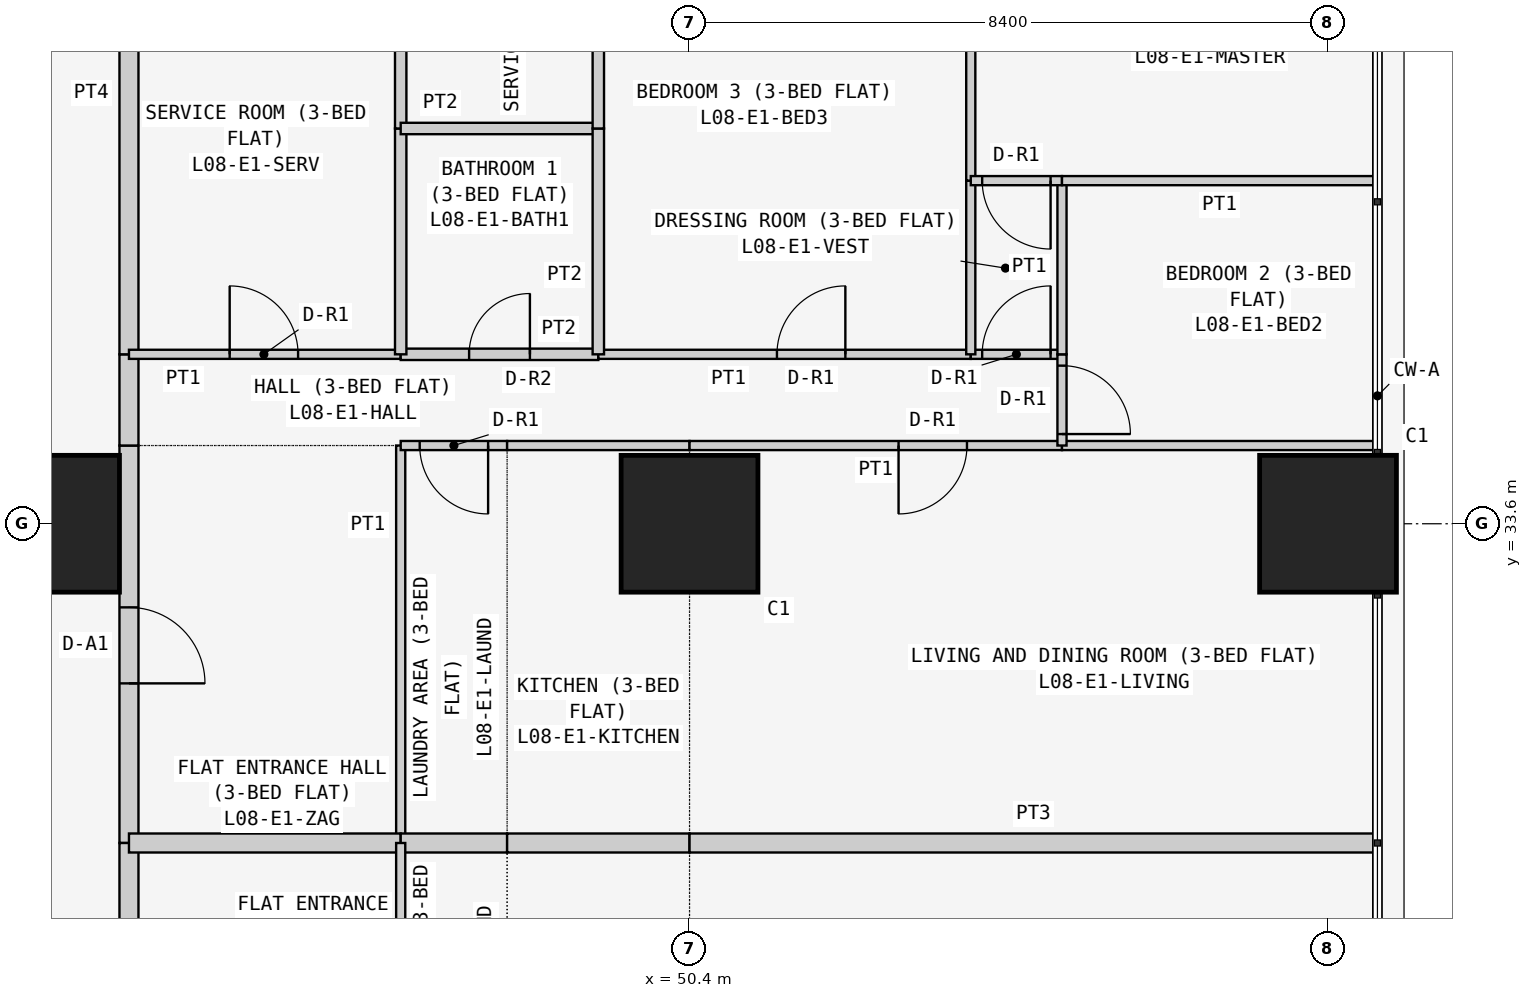
"""IFC4 building model, lengths in metres.
Left out: names, types, materials, properties, quantities, classifications, styles, units other than length and angle.
Written with IfcOpenShell. Run it as: python <this file> out.ifc"""

import sys

from ifc_helpers import new_model, si_unit, direction, frame, frame_2d, origin, origin_2d, place, context, subcontext, project, spatial, rectangle, extrude, element, fill, save


model = new_model("IFC4")
c1 = context("Model", 3, precision=1e-05, world=origin(), true_north=direction((0.0, 1.0)))
c2 = subcontext(c1, "Body", "Model", "MODEL_VIEW")
j1 = project(units=[si_unit("LENGTHUNIT", "METRE"), si_unit("PLANEANGLEUNIT", "RADIAN")], contexts=[c1])
p1 = place(None, origin())
s1 = spatial("IfcSite", under=j1, at=p1, CompositionType="ELEMENT")
p2 = place(p1, origin())
s2 = spatial("IfcBuilding", under=s1, at=p2, CompositionType="ELEMENT")
p3 = place(p2, frame((0.0, 0.0, 38.1)))
s3 = spatial("IfcBuildingStorey", under=s2, at=p3, CompositionType="ELEMENT", Elevation=38.1)
for number, where, z_axis, x_axis in (
    (1, (42.0, 33.6, 0.0), (0.0, 0.0, 1.0), (1.0, 0.0, 0.0)),
    (2, (50.4, 33.6, 0.0), (0.0, 0.0, 1.0), (1.0, 0.0, 0.0)),
    (3, (58.8, 33.6, 0.0), (0.0, 0.0, 1.0), (1.0, 0.0, 0.0)),
):
    element("IfcColumn", number, at=place(p3, frame(where, z_axis=z_axis, x_axis=x_axis)), inside=s3, PredefinedType="COLUMN", context=c2, shape_type="SweptSolid", body=[
        extrude(rectangle(XDim=1.8, YDim=1.8, at=origin_2d()), origin(), (0.0, 0.0, 1.0), 3.6),
    ])
p4 = place(p3, frame((43.025, 34.629, 0.0), z_axis=(0.0, 0.0, 1.0), x_axis=(0.0, -1.0, 0.0)))
e4 = element("IfcWall", 4, at=p4, inside=s3, PredefinedType="PARTITIONING", context=c2, shape_type="SweptSolid", body=[
    extrude(rectangle(XDim=5.229, YDim=0.25, at=frame_2d((2.615, 0.0))), origin(), (0.0, 0.0, 1.0), 3.45),
])
p5 = place(p4, frame((2.129, 0.0, 0.0)))
e5 = element("IfcOpeningElement", 5, at=p5, cuts=e4, PredefinedType="OPENING", context=c2, shape_type="SweptSolid", body=[
    extrude(rectangle(XDim=1.0, YDim=2.1, at=frame_2d((0.5, 1.05))), frame((0.0, 0.135, 0.0), z_axis=(0.0, -1.0, 0.0), x_axis=(1.0, 0.0, 0.0)), (0.0, 0.0, 1.0), 0.27),
])
p6 = place(p3, frame((43.025, 35.829, 0.0), z_axis=(0.0, 0.0, 1.0), x_axis=(0.0, -1.0, 0.0)))
e6 = element("IfcWall", 6, at=p6, inside=s3, PredefinedType="PARTITIONING", context=c2, shape_type="SweptSolid", body=[
    extrude(rectangle(XDim=1.2, YDim=0.25, at=frame_2d((0.6, 0.0))), origin(), (0.0, 0.0, 1.0), 3.45),
])
p7 = place(p3, frame((43.025, 42.7, 0.0), z_axis=(0.0, 0.0, 1.0), x_axis=(0.0, -1.0, 0.0)))
e7 = element("IfcWall", 7, at=p7, inside=s3, PredefinedType="PARTITIONING", context=c2, shape_type="SweptSolid", body=[
    extrude(rectangle(XDim=6.871, YDim=0.25, at=frame_2d((3.436, 0.0))), origin(), (0.0, 0.0, 1.0), 3.45),
])
p8 = place(p3, frame((43.025, 29.4, 0.0), z_axis=(0.0, 0.0, 1.0), x_axis=(0.0, -1.0, 0.0)))
e8 = element("IfcWall", 8, at=p8, inside=s3, PredefinedType="PARTITIONING", context=c2, shape_type="SweptSolid", body=[
    extrude(rectangle(XDim=5.229, YDim=0.25, at=frame_2d((2.615, 0.0))), origin(), (0.0, 0.0, 1.0), 3.45),
])
p9 = place(p8, frame((2.1, 0.0, 0.0)))
e9 = element("IfcOpeningElement", 9, at=p9, cuts=e8, PredefinedType="OPENING", context=c2, shape_type="SweptSolid", body=[
    extrude(rectangle(XDim=1.0, YDim=2.1, at=frame_2d((0.5, 1.05))), frame((0.0, 0.135, 0.0), z_axis=(0.0, -1.0, 0.0), x_axis=(1.0, 0.0, 0.0)), (0.0, 0.0, 1.0), 0.27),
])
p10 = place(p3, frame((46.6, 29.4, 0.0), z_axis=(0.0, 0.0, 1.0), x_axis=(0.0, 1.0, 0.0)))
e10 = element("IfcWall", 10, at=p10, inside=s3, PredefinedType="PARTITIONING", context=c2, shape_type="SweptSolid", body=[
    extrude(rectangle(XDim=5.229, YDim=0.12, at=frame_2d((2.615, 0.0))), origin(), (0.0, 0.0, 1.0), 3.45),
])
p11 = place(p3, frame((43.025, 29.4, 0.0), z_axis=(0.0, 0.0, 1.0), x_axis=(1.0, 0.0, 0.0)))
e11 = element("IfcWall", 11, at=p11, inside=s3, PredefinedType="PARTITIONING", context=c2, shape_type="SweptSolid", body=[
    extrude(rectangle(XDim=3.575, YDim=0.25, at=frame_2d((1.788, 0.0))), origin(), (0.0, 0.0, 1.0), 3.45),
])
p12 = place(p3, frame((48.0, 34.629, 0.0), z_axis=(0.0, 0.0, 1.0), x_axis=(-1.0, 0.0, 0.0)))
e12 = element("IfcWall", 12, at=p12, inside=s3, PredefinedType="PARTITIONING", context=c2, shape_type="SweptSolid", body=[
    extrude(rectangle(XDim=1.4, YDim=0.12, at=frame_2d((0.7, 0.0))), origin(), (0.0, 0.0, 1.0), 3.45),
])
p13 = place(p12, frame((0.25, 0.0, 0.0)))
e13 = element("IfcOpeningElement", 13, at=p13, cuts=e12, PredefinedType="OPENING", context=c2, shape_type="SweptSolid", body=[
    extrude(rectangle(XDim=0.9, YDim=2.1, at=frame_2d((0.45, 1.05))), frame((0.0, 0.07, 0.0), z_axis=(0.0, -1.0, 0.0), x_axis=(1.0, 0.0, 0.0)), (0.0, 0.0, 1.0), 0.14),
])
p14 = place(p3, frame((46.6, 29.4, 0.0), z_axis=(0.0, 0.0, 1.0), x_axis=(1.0, 0.0, 0.0)))
e14 = element("IfcWall", 14, at=p14, inside=s3, PredefinedType="PARTITIONING", context=c2, shape_type="SweptSolid", body=[
    extrude(rectangle(XDim=1.4, YDim=0.25, at=frame_2d((0.7, 0.0))), origin(), (0.0, 0.0, 1.0), 3.45),
])
p15 = place(p3, frame((50.4, 34.629, 0.0), z_axis=(0.0, 0.0, 1.0), x_axis=(-1.0, 0.0, 0.0)))
e15 = element("IfcWall", 15, at=p15, inside=s3, PredefinedType="PARTITIONING", context=c2, shape_type="SweptSolid", body=[
    extrude(rectangle(XDim=2.4, YDim=0.12, at=frame_2d((1.2, 0.0))), origin(), (0.0, 0.0, 1.0), 3.45),
])
p16 = place(p3, frame((48.0, 29.4, 0.0), z_axis=(0.0, 0.0, 1.0), x_axis=(1.0, 0.0, 0.0)))
e16 = element("IfcWall", 16, at=p16, inside=s3, PredefinedType="PARTITIONING", context=c2, shape_type="SweptSolid", body=[
    extrude(rectangle(XDim=2.4, YDim=0.25, at=frame_2d((1.2, 0.0))), origin(), (0.0, 0.0, 1.0), 3.45),
])
p17 = place(p3, frame((55.3, 34.629, 0.0), z_axis=(0.0, 0.0, 1.0), x_axis=(-1.0, 0.0, 0.0)))
e17 = element("IfcWall", 17, at=p17, inside=s3, PredefinedType="PARTITIONING", context=c2, shape_type="SweptSolid", body=[
    extrude(rectangle(XDim=4.9, YDim=0.12, at=frame_2d((2.45, 0.0))), origin(), (0.0, 0.0, 1.0), 3.45),
])
p18 = place(p17, frame((1.25, 0.0, 0.0)))
e18 = element("IfcOpeningElement", 18, at=p18, cuts=e17, PredefinedType="OPENING", context=c2, shape_type="SweptSolid", body=[
    extrude(rectangle(XDim=0.9, YDim=2.1, at=frame_2d((0.45, 1.05))), frame((0.0, 0.07, 0.0), z_axis=(0.0, -1.0, 0.0), x_axis=(1.0, 0.0, 0.0)), (0.0, 0.0, 1.0), 0.14),
])
p19 = place(p3, frame((59.45, 34.629, 0.0), z_axis=(0.0, 0.0, 1.0), x_axis=(-1.0, 0.0, 0.0)))
e19 = element("IfcWall", 19, at=p19, inside=s3, PredefinedType="PARTITIONING", context=c2, shape_type="SweptSolid", body=[
    extrude(rectangle(XDim=4.15, YDim=0.12, at=frame_2d((2.075, 0.0))), origin(), (0.0, 0.0, 1.0), 3.45),
])
p20 = place(p3, frame((50.4, 29.4, 0.0), z_axis=(0.0, 0.0, 1.0), x_axis=(1.0, 0.0, 0.0)))
e20 = element("IfcWall", 20, at=p20, inside=s3, PredefinedType="PARTITIONING", context=c2, shape_type="SweptSolid", body=[
    extrude(rectangle(XDim=9.05, YDim=0.25, at=frame_2d((4.525, 0.0))), origin(), (0.0, 0.0, 1.0), 3.45),
])
p21 = place(p3, frame((46.6, 35.829, 0.0), z_axis=(0.0, 0.0, 1.0), x_axis=(-1.0, 0.0, 0.0)))
e21 = element("IfcWall", 21, at=p21, inside=s3, PredefinedType="PARTITIONING", context=c2, shape_type="SweptSolid", body=[
    extrude(rectangle(XDim=3.575, YDim=0.12, at=frame_2d((1.788, 0.0))), origin(), (0.0, 0.0, 1.0), 3.45),
])
p22 = place(p21, frame((1.35, 0.0, 0.0)))
e22 = element("IfcOpeningElement", 22, at=p22, cuts=e21, PredefinedType="OPENING", context=c2, shape_type="SweptSolid", body=[
    extrude(rectangle(XDim=0.9, YDim=2.1, at=frame_2d((0.45, 1.05))), frame((0.0, 0.07, 0.0), z_axis=(0.0, -1.0, 0.0), x_axis=(1.0, 0.0, 0.0)), (0.0, 0.0, 1.0), 0.14),
])
p23 = place(p3, frame((49.2, 35.829, 0.0), z_axis=(0.0, 0.0, 1.0), x_axis=(-1.0, 0.0, 0.0)))
e23 = element("IfcWall", 23, at=p23, inside=s3, PredefinedType="PARTITIONING", context=c2, shape_type="SweptSolid", body=[
    extrude(rectangle(XDim=2.6, YDim=0.15, at=frame_2d((1.3, 0.0))), origin(), (0.0, 0.0, 1.0), 3.45),
])
p24 = place(p23, frame((0.9, 0.0, 0.0)))
e24 = element("IfcOpeningElement", 24, at=p24, cuts=e23, PredefinedType="OPENING", context=c2, shape_type="SweptSolid", body=[
    extrude(rectangle(XDim=0.8, YDim=2.1, at=frame_2d((0.4, 1.05))), frame((0.0, 0.085, 0.0), z_axis=(0.0, -1.0, 0.0), x_axis=(1.0, 0.0, 0.0)), (0.0, 0.0, 1.0), 0.17),
])
p25 = place(p3, frame((54.1, 35.829, 0.0), z_axis=(0.0, 0.0, 1.0), x_axis=(-1.0, 0.0, 0.0)))
e25 = element("IfcWall", 25, at=p25, inside=s3, PredefinedType="PARTITIONING", context=c2, shape_type="SweptSolid", body=[
    extrude(rectangle(XDim=4.9, YDim=0.12, at=frame_2d((2.45, 0.0))), origin(), (0.0, 0.0, 1.0), 3.45),
])
p26 = place(p25, frame((1.65, 0.0, 0.0)))
e26 = element("IfcOpeningElement", 26, at=p26, cuts=e25, PredefinedType="OPENING", context=c2, shape_type="SweptSolid", body=[
    extrude(rectangle(XDim=0.9, YDim=2.1, at=frame_2d((0.45, 1.05))), frame((0.0, 0.07, 0.0), z_axis=(0.0, -1.0, 0.0), x_axis=(1.0, 0.0, 0.0)), (0.0, 0.0, 1.0), 0.14),
])
p27 = place(p3, frame((55.3, 35.829, 0.0), z_axis=(0.0, 0.0, 1.0), x_axis=(-1.0, 0.0, 0.0)))
e27 = element("IfcWall", 27, at=p27, inside=s3, PredefinedType="PARTITIONING", context=c2, shape_type="SweptSolid", body=[
    extrude(rectangle(XDim=1.2, YDim=0.12, at=frame_2d((0.6, 0.0))), origin(), (0.0, 0.0, 1.0), 3.45),
])
p28 = place(p27, frame((0.15, 0.0, 0.0)))
e28 = element("IfcOpeningElement", 28, at=p28, cuts=e27, PredefinedType="OPENING", context=c2, shape_type="SweptSolid", body=[
    extrude(rectangle(XDim=0.9, YDim=2.1, at=frame_2d((0.45, 1.05))), frame((0.0, 0.07, 0.0), z_axis=(0.0, -1.0, 0.0), x_axis=(1.0, 0.0, 0.0)), (0.0, 0.0, 1.0), 0.14),
])
p29 = place(p3, frame((55.3, 34.629, 0.0), z_axis=(0.0, 0.0, 1.0), x_axis=(0.0, 1.0, 0.0)))
e29 = element("IfcWall", 29, at=p29, inside=s3, PredefinedType="PARTITIONING", context=c2, shape_type="SweptSolid", body=[
    extrude(rectangle(XDim=1.2, YDim=0.12, at=frame_2d((0.6, 0.0))), origin(), (0.0, 0.0, 1.0), 3.45),
])
p30 = place(p29, frame((0.151, 0.0, 0.0)))
e30 = element("IfcOpeningElement", 30, at=p30, cuts=e29, PredefinedType="OPENING", context=c2, shape_type="SweptSolid", body=[
    extrude(rectangle(XDim=0.9, YDim=2.1, at=frame_2d((0.45, 1.05))), frame((0.0, 0.07, 0.0), z_axis=(0.0, -1.0, 0.0), x_axis=(1.0, 0.0, 0.0)), (0.0, 0.0, 1.0), 0.14),
])
p31 = place(p3, frame((46.6, 35.829, 0.0), z_axis=(0.0, 0.0, 1.0), x_axis=(0.0, 1.0, 0.0)))
e31 = element("IfcWall", 31, at=p31, inside=s3, PredefinedType="PARTITIONING", context=c2, shape_type="SweptSolid", body=[
    extrude(rectangle(XDim=2.971, YDim=0.15, at=frame_2d((1.485, 0.0))), origin(), (0.0, 0.0, 1.0), 3.45),
])
p32 = place(p3, frame((46.6, 38.8, 0.0), z_axis=(0.0, 0.0, 1.0), x_axis=(0.0, 1.0, 0.0)))
e32 = element("IfcWall", 32, at=p32, inside=s3, PredefinedType="PARTITIONING", context=c2, shape_type="SweptSolid", body=[
    extrude(rectangle(XDim=3.9, YDim=0.15, at=frame_2d((1.95, 0.0))), origin(), (0.0, 0.0, 1.0), 3.45),
])
p33 = place(p32, frame((1.55, 0.0, 0.0)))
e33 = element("IfcOpeningElement", 33, at=p33, cuts=e32, PredefinedType="OPENING", context=c2, shape_type="SweptSolid", body=[
    extrude(rectangle(XDim=0.8, YDim=2.1, at=frame_2d((0.4, 1.05))), frame((0.0, 0.085, 0.0), z_axis=(0.0, -1.0, 0.0), x_axis=(1.0, 0.0, 0.0)), (0.0, 0.0, 1.0), 0.17),
])
p34 = place(p3, frame((49.2, 38.8, 0.0), z_axis=(0.0, 0.0, 1.0), x_axis=(-1.0, 0.0, 0.0)))
e34 = element("IfcWall", 34, at=p34, inside=s3, PredefinedType="PARTITIONING", context=c2, shape_type="SweptSolid", body=[
    extrude(rectangle(XDim=2.6, YDim=0.15, at=frame_2d((1.3, 0.0))), origin(), (0.0, 0.0, 1.0), 3.45),
])
p35 = place(p3, frame((49.2, 35.829, 0.0), z_axis=(0.0, 0.0, 1.0), x_axis=(0.0, 1.0, 0.0)))
e35 = element("IfcWall", 35, at=p35, inside=s3, PredefinedType="PARTITIONING", context=c2, shape_type="SweptSolid", body=[
    extrude(rectangle(XDim=2.971, YDim=0.15, at=frame_2d((1.485, 0.0))), origin(), (0.0, 0.0, 1.0), 3.45),
])
p36 = place(p3, frame((49.2, 38.8, 0.0), z_axis=(0.0, 0.0, 1.0), x_axis=(0.0, 1.0, 0.0)))
e36 = element("IfcWall", 36, at=p36, inside=s3, PredefinedType="PARTITIONING", context=c2, shape_type="SweptSolid", body=[
    extrude(rectangle(XDim=3.9, YDim=0.15, at=frame_2d((1.95, 0.0))), origin(), (0.0, 0.0, 1.0), 3.45),
])
p37 = place(p3, frame((54.1, 35.829, 0.0), z_axis=(0.0, 0.0, 1.0), x_axis=(0.0, 1.0, 0.0)))
e37 = element("IfcWall", 37, at=p37, inside=s3, PredefinedType="PARTITIONING", context=c2, shape_type="SweptSolid", body=[
    extrude(rectangle(XDim=2.285, YDim=0.12, at=frame_2d((1.143, 0.0))), origin(), (0.0, 0.0, 1.0), 3.45),
])
p38 = place(p3, frame((54.1, 38.114, 0.0), z_axis=(0.0, 0.0, 1.0), x_axis=(0.0, 1.0, 0.0)))
e38 = element("IfcWall", 38, at=p38, inside=s3, PredefinedType="PARTITIONING", context=c2, shape_type="SweptSolid", body=[
    extrude(rectangle(XDim=4.586, YDim=0.12, at=frame_2d((2.293, 0.0))), origin(), (0.0, 0.0, 1.0), 3.45),
])
p39 = place(p3, frame((55.3, 35.829, 0.0), z_axis=(0.0, 0.0, 1.0), x_axis=(0.0, 1.0, 0.0)))
e39 = element("IfcWall", 39, at=p39, inside=s3, PredefinedType="PARTITIONING", context=c2, shape_type="SweptSolid", body=[
    extrude(rectangle(XDim=2.285, YDim=0.12, at=frame_2d((1.143, 0.0))), origin(), (0.0, 0.0, 1.0), 3.45),
])
p40 = place(p3, frame((55.3, 38.114, 0.0), z_axis=(0.0, 0.0, 1.0), x_axis=(-1.0, 0.0, 0.0)))
e40 = element("IfcWall", 40, at=p40, inside=s3, PredefinedType="PARTITIONING", context=c2, shape_type="SweptSolid", body=[
    extrude(rectangle(XDim=1.2, YDim=0.12, at=frame_2d((0.6, 0.0))), origin(), (0.0, 0.0, 1.0), 3.45),
])
p41 = place(p40, frame((0.15, 0.0, 0.0)))
e41 = element("IfcOpeningElement", 41, at=p41, cuts=e40, PredefinedType="OPENING", context=c2, shape_type="SweptSolid", body=[
    extrude(rectangle(XDim=0.9, YDim=2.1, at=frame_2d((0.45, 1.05))), frame((0.0, 0.07, 0.0), z_axis=(0.0, -1.0, 0.0), x_axis=(1.0, 0.0, 0.0)), (0.0, 0.0, 1.0), 0.14),
])
p42 = place(p3, frame((59.45, 38.114, 0.0), z_axis=(0.0, 0.0, 1.0), x_axis=(-1.0, 0.0, 0.0)))
e42 = element("IfcWall", 42, at=p42, inside=s3, PredefinedType="PARTITIONING", context=c2, shape_type="SweptSolid", body=[
    extrude(rectangle(XDim=4.15, YDim=0.12, at=frame_2d((2.075, 0.0))), origin(), (0.0, 0.0, 1.0), 3.45),
])
p43 = place(p3, frame((46.6, 29.4, 0.0), z_axis=(0.0, 0.0, 1.0), x_axis=(0.0, -1.0, 0.0)))
e43 = element("IfcWall", 43, at=p43, inside=s3, PredefinedType="PARTITIONING", context=c2, shape_type="SweptSolid", body=[
    extrude(rectangle(XDim=5.229, YDim=0.12, at=frame_2d((2.615, 0.0))), origin(), (0.0, 0.0, 1.0), 3.45),
])
p44 = place(p5, origin())
e44 = element("IfcDoor", 44, at=p44, inside=s3, OperationType="SINGLE_SWING_RIGHT", PredefinedType="DOOR", context=c2, shape_type="SweptSolid", body=[
    extrude(rectangle(XDim=1.0, YDim=2.1, at=frame_2d((0.5, 1.05))), frame((0.0, 0.025, 0.0), z_axis=(0.0, -1.0, 0.0), x_axis=(1.0, 0.0, 0.0)), (0.0, 0.0, 1.0), 0.05),
])
fill(e5, e44)
p45 = place(p13, origin())
e45 = element("IfcDoor", 45, at=p45, inside=s3, OperationType="SINGLE_SWING_LEFT", PredefinedType="DOOR", context=c2, shape_type="SweptSolid", body=[
    extrude(rectangle(XDim=0.9, YDim=2.1, at=frame_2d((0.45, 1.05))), frame((0.0, 0.025, 0.0), z_axis=(0.0, -1.0, 0.0), x_axis=(1.0, 0.0, 0.0)), (0.0, 0.0, 1.0), 0.05),
])
fill(e13, e45)
p46 = place(p18, origin())
e46 = element("IfcDoor", 46, at=p46, inside=s3, OperationType="SINGLE_SWING_RIGHT", PredefinedType="DOOR", context=c2, shape_type="SweptSolid", body=[
    extrude(rectangle(XDim=0.9, YDim=2.1, at=frame_2d((0.45, 1.05))), frame((0.0, 0.025, 0.0), z_axis=(0.0, -1.0, 0.0), x_axis=(1.0, 0.0, 0.0)), (0.0, 0.0, 1.0), 0.05),
])
fill(e18, e46)
p47 = place(p22, frame((0.9, 0.0, 0.0), z_axis=(0.0, 0.0, 1.0), x_axis=(-1.0, 0.0, 0.0)))
e47 = element("IfcDoor", 47, at=p47, inside=s3, OperationType="SINGLE_SWING_LEFT", PredefinedType="DOOR", context=c2, shape_type="SweptSolid", body=[
    extrude(rectangle(XDim=0.9, YDim=2.1, at=frame_2d((0.45, 1.05))), frame((0.0, 0.025, 0.0), z_axis=(0.0, -1.0, 0.0), x_axis=(1.0, 0.0, 0.0)), (0.0, 0.0, 1.0), 0.05),
])
fill(e22, e47)
p48 = place(p24, frame((0.8, 0.0, 0.0), z_axis=(0.0, 0.0, 1.0), x_axis=(-1.0, 0.0, 0.0)))
e48 = element("IfcDoor", 48, at=p48, inside=s3, OperationType="SINGLE_SWING_RIGHT", PredefinedType="DOOR", context=c2, shape_type="SweptSolid", body=[
    extrude(rectangle(XDim=0.8, YDim=2.1, at=frame_2d((0.4, 1.05))), frame((0.0, 0.025, 0.0), z_axis=(0.0, -1.0, 0.0), x_axis=(1.0, 0.0, 0.0)), (0.0, 0.0, 1.0), 0.05),
])
fill(e24, e48)
p49 = place(p26, frame((0.9, 0.0, 0.0), z_axis=(0.0, 0.0, 1.0), x_axis=(-1.0, 0.0, 0.0)))
e49 = element("IfcDoor", 49, at=p49, inside=s3, OperationType="SINGLE_SWING_RIGHT", PredefinedType="DOOR", context=c2, shape_type="SweptSolid", body=[
    extrude(rectangle(XDim=0.9, YDim=2.1, at=frame_2d((0.45, 1.05))), frame((0.0, 0.025, 0.0), z_axis=(0.0, -1.0, 0.0), x_axis=(1.0, 0.0, 0.0)), (0.0, 0.0, 1.0), 0.05),
])
fill(e26, e49)
p50 = place(p28, frame((0.9, 0.0, 0.0), z_axis=(0.0, 0.0, 1.0), x_axis=(-1.0, 0.0, 0.0)))
e50 = element("IfcDoor", 50, at=p50, inside=s3, OperationType="SINGLE_SWING_RIGHT", PredefinedType="DOOR", context=c2, shape_type="SweptSolid", body=[
    extrude(rectangle(XDim=0.9, YDim=2.1, at=frame_2d((0.45, 1.05))), frame((0.0, 0.025, 0.0), z_axis=(0.0, -1.0, 0.0), x_axis=(1.0, 0.0, 0.0)), (0.0, 0.0, 1.0), 0.05),
])
fill(e28, e50)
p51 = place(p41, origin())
e51 = element("IfcDoor", 51, at=p51, inside=s3, OperationType="SINGLE_SWING_LEFT", PredefinedType="DOOR", context=c2, shape_type="SweptSolid", body=[
    extrude(rectangle(XDim=0.9, YDim=2.1, at=frame_2d((0.45, 1.05))), frame((0.0, 0.025, 0.0), z_axis=(0.0, -1.0, 0.0), x_axis=(1.0, 0.0, 0.0)), (0.0, 0.0, 1.0), 0.05),
])
fill(e41, e51)
p52 = place(p30, frame((0.9, 0.0, 0.0), z_axis=(0.0, 0.0, 1.0), x_axis=(-1.0, 0.0, 0.0)))
e52 = element("IfcDoor", 52, at=p52, inside=s3, OperationType="SINGLE_SWING_RIGHT", PredefinedType="DOOR", context=c2, shape_type="SweptSolid", body=[
    extrude(rectangle(XDim=0.9, YDim=2.1, at=frame_2d((0.45, 1.05))), frame((0.0, 0.025, 0.0), z_axis=(0.0, -1.0, 0.0), x_axis=(1.0, 0.0, 0.0)), (0.0, 0.0, 1.0), 0.05),
])
fill(e30, e52)
save(model, sys.argv[1])
